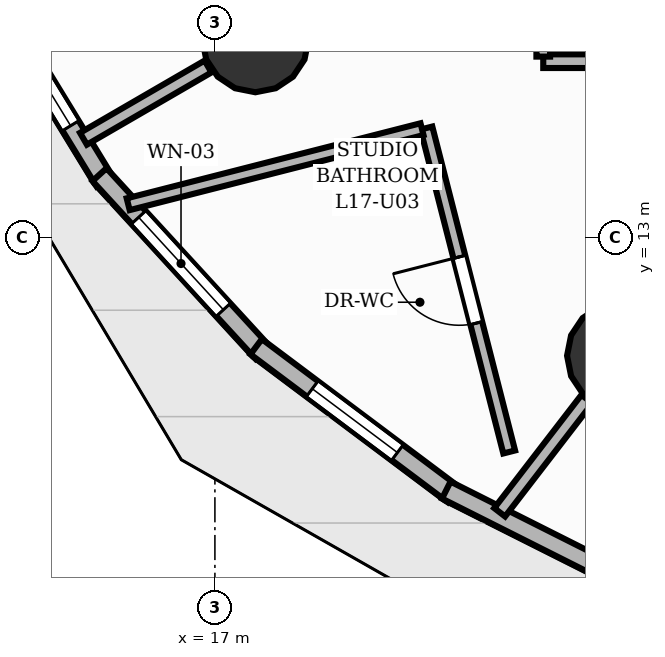
"""IFC4 building model, lengths in metres.
Left out: names, types, materials, properties, quantities, classifications, styles, units other than length and angle.
Written with IfcOpenShell. Run it as: python <this file> out.ifc"""

import sys

from ifc_helpers import new_model, si_unit, direction, frame, frame_2d, origin, origin_2d, place, context, subcontext, project, spatial, rectangle, circle, extrude, element, fill, save


model = new_model("IFC4")
c1 = context("Model", 3, precision=1e-05, world=origin(), true_north=direction((0.0, 1.0)))
c2 = subcontext(c1, "Body", "Model", "MODEL_VIEW")
j1 = project(units=[si_unit("LENGTHUNIT", "METRE"), si_unit("PLANEANGLEUNIT", "RADIAN")], contexts=[c1])
p1 = place(None, origin())
s1 = spatial("IfcSite", under=j1, at=p1, CompositionType="ELEMENT")
p2 = place(p1, origin())
s2 = spatial("IfcBuilding", under=s1, at=p2, CompositionType="ELEMENT")
p3 = place(p2, frame((0.0, 0.0, 60.0)))
s3 = spatial("IfcBuildingStorey", under=s2, at=p3, CompositionType="ELEMENT", Elevation=60.0)
for number, where, z_axis, x_axis in (
    (1, (17.532, 15.611, 0.0), (0.0, 0.0, 1.0), (1.0, 0.0, 0.0)),
    (2, (22.333, 11.445, 0.0), (0.0, 0.0, 1.0), (1.0, 0.0, 0.0)),
):
    element("IfcColumn", number, at=place(p3, frame(where, z_axis=z_axis, x_axis=x_axis)), inside=s3, PredefinedType="COLUMN", context=c2, shape_type="SweptSolid", body=[
        extrude(circle(Radius=0.7, at=origin_2d()), origin(), (0.0, 0.0, 1.0), 3.2),
    ])
p4 = place(p3, frame((15.55, 13.737, 0.0), z_axis=(0.0, 0.0, 1.0), x_axis=(-0.521370891217, 0.853330178648, 0.0)))
e3 = element("IfcWall", 3, at=p4, inside=s3, PredefinedType="SOLIDWALL", context=c2, shape_type="SweptSolid", body=[
    extrude(rectangle(XDim=3.121, YDim=0.25, at=frame_2d((1.56, 0.0))), origin(), (0.0, 0.0, 1.0), 2.96),
])
p5 = place(p4, frame((0.86, 0.0, 0.85)))
e4 = element("IfcOpeningElement", 4, at=p5, cuts=e3, PredefinedType="OPENING", context=c2, shape_type="SweptSolid", body=[
    extrude(rectangle(XDim=1.4, YDim=1.29, at=frame_2d((0.7, 0.645))), frame((0.0, 0.135, 0.0), z_axis=(0.0, -1.0, 0.0), x_axis=(1.0, 0.0, 0.0)), (0.0, 0.0, 1.0), 0.27),
])
p6 = place(p3, frame((17.626, 11.488, 0.0), z_axis=(0.0, 0.0, 1.0), x_axis=(-0.675710696367, 0.737166911096, 0.0)))
e5 = element("IfcWall", 5, at=p6, inside=s3, PredefinedType="SOLIDWALL", context=c2, shape_type="SweptSolid", body=[
    extrude(rectangle(XDim=3.174, YDim=0.25, at=frame_2d((1.587, 0.0))), origin(), (0.0, 0.0, 1.0), 2.96),
])
p7 = place(p6, frame((0.762, 0.0, 0.85)))
e6 = element("IfcOpeningElement", 6, at=p7, cuts=e5, PredefinedType="OPENING", context=c2, shape_type="SweptSolid", body=[
    extrude(rectangle(XDim=1.65, YDim=1.55, at=frame_2d((0.825, 0.775))), frame((0.0, 0.135, 0.0), z_axis=(0.0, -1.0, 0.0), x_axis=(1.0, 0.0, 0.0)), (0.0, 0.0, 1.0), 0.27),
])
p8 = place(p3, frame((20.139, 9.617, 0.0), z_axis=(0.0, 0.0, 1.0), x_axis=(-0.800198613696, 0.599735090385, 0.0)))
e7 = element("IfcWall", 7, at=p8, inside=s3, PredefinedType="SOLIDWALL", context=c2, shape_type="SweptSolid", body=[
    extrude(rectangle(XDim=3.244, YDim=0.25, at=frame_2d((1.622, 0.0))), origin(), (0.0, 0.0, 1.0), 2.96),
])
p9 = place(p8, frame((0.922, 0.0, 0.85)))
e8 = element("IfcOpeningElement", 8, at=p9, cuts=e7, PredefinedType="OPENING", context=c2, shape_type="SweptSolid", body=[
    extrude(rectangle(XDim=1.4, YDim=1.55, at=frame_2d((0.7, 0.775))), frame((0.0, 0.135, 0.0), z_axis=(0.0, -1.0, 0.0), x_axis=(1.0, 0.0, 0.0)), (0.0, 0.0, 1.0), 0.27),
])
p10 = place(p3, frame((23.012, 8.183, 0.0), z_axis=(0.0, 0.0, 1.0), x_axis=(-0.893351919744, 0.449357705498, 0.0)))
e9 = element("IfcWall", 9, at=p10, inside=s3, PredefinedType="SOLIDWALL", context=c2, shape_type="SweptSolid", body=[
    extrude(rectangle(XDim=3.323, YDim=0.25, at=frame_2d((1.662, 0.0))), origin(), (0.0, 0.0, 1.0), 2.96),
])
p11 = place(p3, frame((16.909, 15.25, 0.0), z_axis=(0.0, 0.0, 1.0), x_axis=(-0.865028951922, -0.501721947234, 0.0)))
e10 = element("IfcWall", 10, at=p11, inside=s3, PredefinedType="PARTITIONING", context=c2, shape_type="SweptSolid", body=[
    extrude(rectangle(XDim=1.894, YDim=0.18, at=frame_2d((0.947, 0.0))), origin(), (0.0, 0.0, 1.0), 2.178),
])
p12 = place(p3, frame((21.894, 10.874, 0.0), z_axis=(0.0, 0.0, 1.0), x_axis=(-0.610131095296, -0.792300477441, 0.0)))
e11 = element("IfcWall", 11, at=p12, inside=s3, PredefinedType="PARTITIONING", context=c2, shape_type="SweptSolid", body=[
    extrude(rectangle(XDim=1.88, YDim=0.18, at=frame_2d((0.94, 0.0))), origin(), (0.0, 0.0, 1.0), 2.178),
])
p13 = place(p3, frame((42.62, 15.32, 0.0), z_axis=(0.0, 0.0, 1.0), x_axis=(-1.0, 0.0, 0.0)))
e12 = element("IfcWall", 12, at=p13, inside=s3, PredefinedType="PARTITIONING", context=c2, shape_type="SweptSolid", body=[
    extrude(rectangle(XDim=21.3, YDim=0.18, at=frame_2d((10.65, 0.0))), origin(), (0.0, 0.0, 1.0), 2.955),
])
p14 = place(p13, frame((5.79, 0.0, 0.0)))
e13 = element("IfcOpeningElement", 13, at=p14, cuts=e12, PredefinedType="OPENING", context=c2, shape_type="SweptSolid", body=[
    extrude(rectangle(XDim=1.05, YDim=2.15, at=frame_2d((0.525, 1.075))), frame((0.0, 0.1, 0.0), z_axis=(0.0, -1.0, 0.0), x_axis=(1.0, 0.0, 0.0)), (0.0, 0.0, 1.0), 0.2),
])
p15 = place(p3, frame((21.32, 15.38, 0.0), z_axis=(0.0, 0.0, 1.0), x_axis=(0.0, 1.0, 0.0)))
e14 = element("IfcWall", 14, at=p15, inside=s3, PredefinedType="PARTITIONING", context=c2, shape_type="SweptSolid", body=[
    extrude(rectangle(XDim=17.3, YDim=0.18, at=frame_2d((8.65, 0.0))), origin(), (0.0, 0.0, 1.0), 2.955),
])
p16 = place(p15, frame((8.125, 0.0, 0.0)))
e15 = element("IfcOpeningElement", 15, at=p16, cuts=e14, PredefinedType="OPENING", context=c2, shape_type="SweptSolid", body=[
    extrude(rectangle(XDim=1.05, YDim=2.15, at=frame_2d((0.525, 1.075))), frame((0.0, 0.1, 0.0), z_axis=(0.0, -1.0, 0.0), x_axis=(1.0, 0.0, 0.0)), (0.0, 0.0, 1.0), 0.2),
])
p17 = place(p3, frame((20.872, 10.178, 0.0), z_axis=(0.0, 0.0, 1.0), x_axis=(-0.247520702126, 0.96888260487, 0.0)))
e16 = element("IfcWall", 16, at=p17, inside=s3, PredefinedType="PLUMBINGWALL", context=c2, shape_type="SweptSolid", body=[
    extrude(rectangle(XDim=4.399, YDim=0.16, at=frame_2d((2.2, 0.0))), origin(), (0.0, 0.0, 1.0), 2.955),
])
p18 = place(p17, frame((1.75, 0.0, 0.0)))
e17 = element("IfcOpeningElement", 17, at=p18, cuts=e16, PredefinedType="OPENING", context=c2, shape_type="SweptSolid", body=[
    extrude(rectangle(XDim=0.9, YDim=2.1, at=frame_2d((0.45, 1.05))), frame((0.0, 0.09, 0.0), z_axis=(0.0, -1.0, 0.0), x_axis=(1.0, 0.0, 0.0)), (0.0, 0.0, 1.0), 0.18),
])
p19 = place(p3, frame((19.725, 14.425, 0.0), z_axis=(0.0, 0.0, 1.0), x_axis=(-0.968902730544, -0.24744190984, 0.0)))
e18 = element("IfcWall", 18, at=p19, inside=s3, PredefinedType="PLUMBINGWALL", context=c2, shape_type="SweptSolid", body=[
    extrude(rectangle(XDim=3.99, YDim=0.16, at=frame_2d((1.995, 0.0))), origin(), (0.0, 0.0, 1.0), 2.641),
])
p20 = place(p5, origin())
e19 = element("IfcWindow", 19, at=p20, inside=s3, PartitioningType="SINGLE_PANEL", PredefinedType="WINDOW", context=c2, shape_type="SweptSolid", body=[
    extrude(rectangle(XDim=1.4, YDim=1.29, at=frame_2d((0.7, 0.645))), frame((0.0, 0.03, 0.0), z_axis=(0.0, -1.0, 0.0), x_axis=(1.0, 0.0, 0.0)), (0.0, 0.0, 1.0), 0.06),
])
fill(e4, e19)
p21 = place(p7, origin())
e20 = element("IfcWindow", 20, at=p21, inside=s3, PartitioningType="SINGLE_PANEL", PredefinedType="WINDOW", context=c2, shape_type="SweptSolid", body=[
    extrude(rectangle(XDim=1.65, YDim=1.55, at=frame_2d((0.825, 0.775))), frame((0.0, 0.03, 0.0), z_axis=(0.0, -1.0, 0.0), x_axis=(1.0, 0.0, 0.0)), (0.0, 0.0, 1.0), 0.06),
])
fill(e6, e20)
p22 = place(p9, origin())
e21 = element("IfcWindow", 21, at=p22, inside=s3, PartitioningType="SINGLE_PANEL", PredefinedType="WINDOW", context=c2, shape_type="SweptSolid", body=[
    extrude(rectangle(XDim=1.4, YDim=1.55, at=frame_2d((0.7, 0.775))), frame((0.0, 0.03, 0.0), z_axis=(0.0, -1.0, 0.0), x_axis=(1.0, 0.0, 0.0)), (0.0, 0.0, 1.0), 0.06),
])
fill(e8, e21)
p23 = place(p18, origin())
e22 = element("IfcDoor", 22, at=p23, inside=s3, OperationType="SINGLE_SWING_RIGHT", PredefinedType="DOOR", context=c2, shape_type="SweptSolid", body=[
    extrude(rectangle(XDim=0.9, YDim=2.1, at=frame_2d((0.45, 1.05))), frame((0.0, 0.025, 0.0), z_axis=(0.0, -1.0, 0.0), x_axis=(1.0, 0.0, 0.0)), (0.0, 0.0, 1.0), 0.05),
])
fill(e17, e22)
save(model, sys.argv[1])
